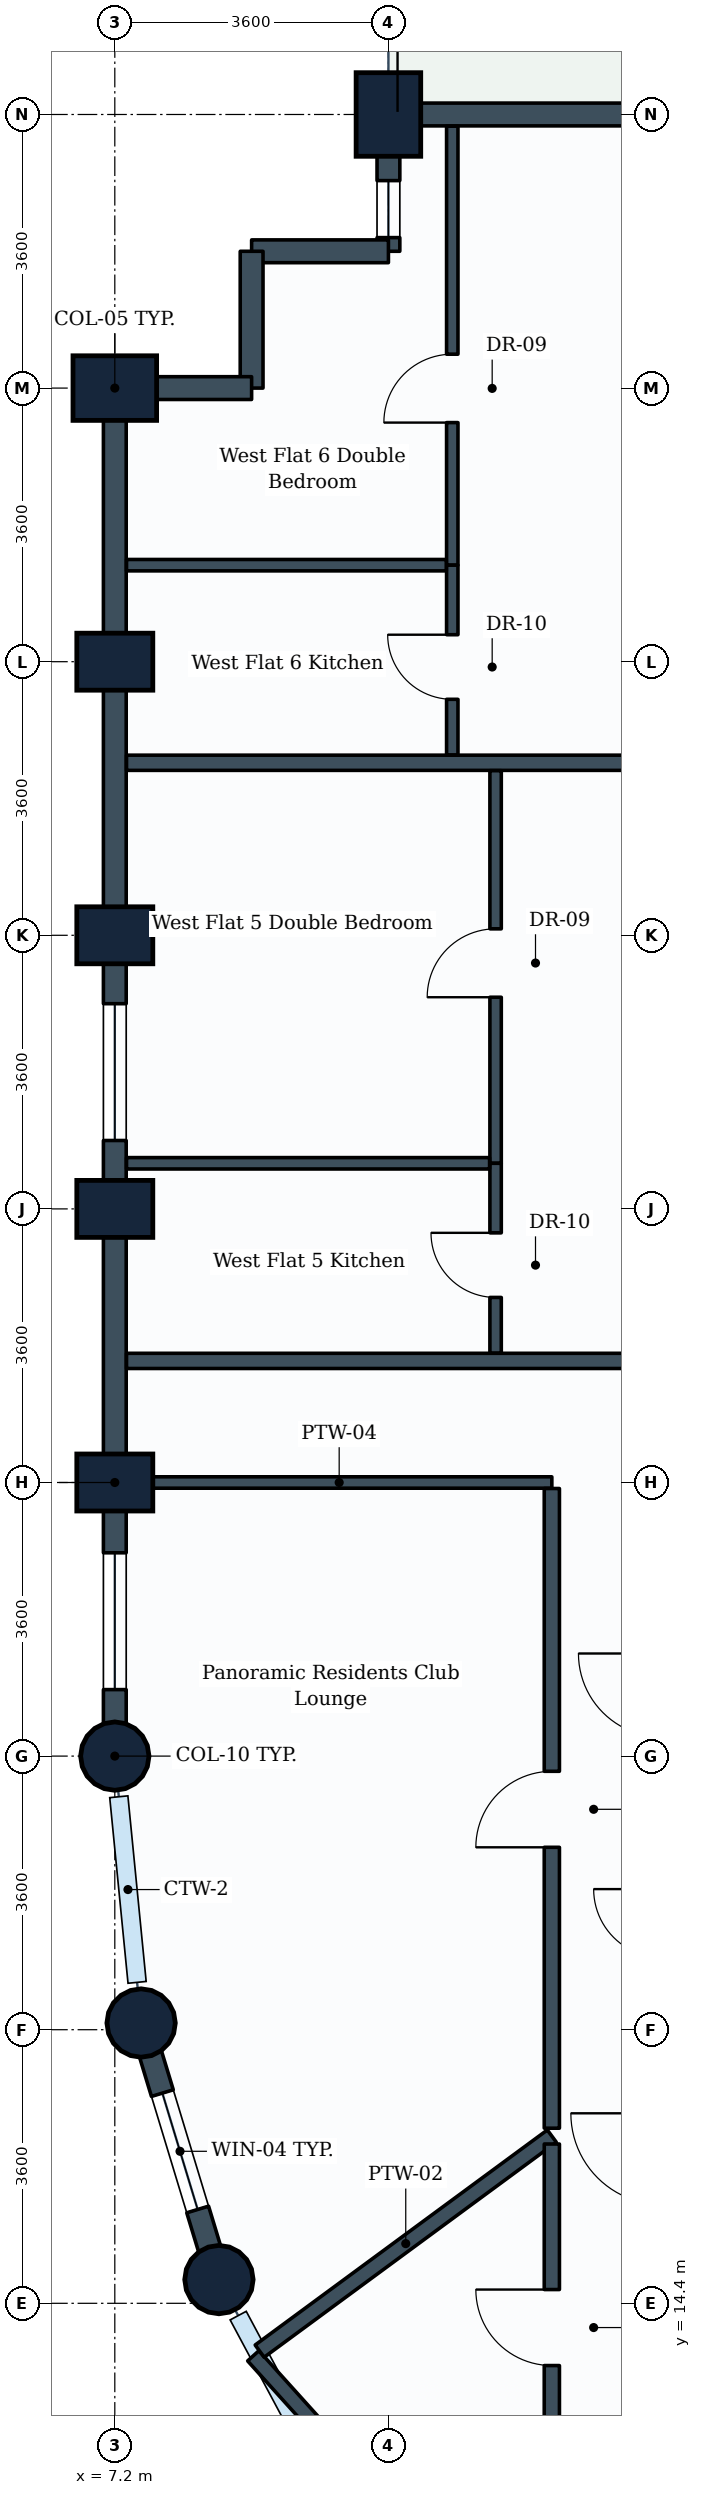
"""IFC4 building model, lengths in metres.
Left out: names, types, materials, properties, quantities, classifications, styles, units other than length and angle.
Written with IfcOpenShell. Run it as: python <this file> out.ifc"""

import sys

from ifc_helpers import new_model, si_unit, direction, frame, frame_2d, origin, origin_2d, place, context, subcontext, project, spatial, rectangle, circle, extrude, element, fill, save


model = new_model("IFC4")
c1 = context("Model", 3, precision=1e-05, world=origin(), true_north=direction((0.0, 1.0)))
c2 = subcontext(c1, "Body", "Model", "MODEL_VIEW")
j1 = project(units=[si_unit("LENGTHUNIT", "METRE"), si_unit("PLANEANGLEUNIT", "RADIAN")], contexts=[c1])
p1 = place(None, origin())
s1 = spatial("IfcSite", under=j1, at=p1, CompositionType="ELEMENT")
p2 = place(p1, origin())
s2 = spatial("IfcBuilding", under=s1, at=p2, CompositionType="ELEMENT")
p3 = place(p2, frame((0.0, 0.0, 135.2)))
s3 = spatial("IfcBuildingStorey", under=s2, at=p3, CompositionType="ELEMENT", Elevation=135.2)
p4 = place(p3, frame((7.2, 21.6, 0.0), z_axis=(0.0, 0.0, 1.0), x_axis=(1.0, 0.0, 0.0)))
e1 = element("IfcColumn", 1, at=p4, inside=s3, PredefinedType="COLUMN", context=c2, shape_type="SweptSolid", body=[
    extrude(circle(Radius=0.45, at=origin_2d()), origin(), (0.0, 0.0, 1.0), 3.8),
])
for number, where, z_axis, x_axis in (
    (2, (7.2, 25.2, 0.0), (0.0, 0.0, 1.0), (0.0, 1.0, 0.0)),
    (3, (7.2, 28.8, 0.0), (0.0, 0.0, 1.0), (0.0, 1.0, 0.0)),
    (4, (7.2, 32.4, 0.0), (0.0, 0.0, 1.0), (0.0, 1.0, 0.0)),
    (5, (7.2, 36.0, 0.0), (0.0, 0.0, 1.0), (0.0, 1.0, 0.0)),
):
    element("IfcColumn", number, at=place(p3, frame(where, z_axis=z_axis, x_axis=x_axis)), inside=s3, PredefinedType="COLUMN", context=c2, shape_type="SweptSolid", body=[
        extrude(rectangle(XDim=0.75, YDim=1.0, at=origin_2d()), origin(), (0.0, 0.0, 1.0), 3.8),
    ])
p5 = place(p3, frame((7.2, 39.6, 0.0), z_axis=(0.0, 0.0, 1.0), x_axis=(0.0, 1.0, 0.0)))
e6 = element("IfcColumn", 6, at=p5, inside=s3, PredefinedType="COLUMN", context=c2, shape_type="SweptSolid", body=[
    extrude(rectangle(XDim=0.85, YDim=1.1, at=origin_2d()), origin(), (0.0, 0.0, 1.0), 3.8),
])
for number, where, z_axis, x_axis in (
    (7, (7.546, 18.088, 0.0), (0.0, 0.0, 1.0), (1.0, 0.0, 0.0)),
    (8, (8.57, 14.712, 0.0), (0.0, 0.0, 1.0), (1.0, 0.0, 0.0)),
):
    element("IfcColumn", number, at=place(p3, frame(where, z_axis=z_axis, x_axis=x_axis)), inside=s3, PredefinedType="COLUMN", context=c2, shape_type="SweptSolid", body=[
        extrude(circle(Radius=0.45, at=origin_2d()), origin(), (0.0, 0.0, 1.0), 3.8),
    ])
p6 = place(p3, frame((10.8, 43.2, 0.0), z_axis=(0.0, 0.0, 1.0), x_axis=(1.0, 0.0, 0.0)))
e9 = element("IfcColumn", 9, at=p6, inside=s3, PredefinedType="COLUMN", context=c2, shape_type="SweptSolid", body=[
    extrude(rectangle(XDim=0.85, YDim=1.1, at=origin_2d()), origin(), (0.0, 0.0, 1.0), 3.8),
])
p7 = place(p3, frame((10.8, 43.2, 0.0), z_axis=(0.0, 0.0, 1.0), x_axis=(1.0, 0.0, 0.0)))
e10 = element("IfcWall", 10, at=p7, inside=s3, PredefinedType="STANDARD", context=c2, shape_type="SweptSolid", body=[
    extrude(rectangle(XDim=3.6, YDim=0.3, at=frame_2d((1.8, 0.0))), origin(), (0.0, 0.0, 1.0), 2.93),
])
p8 = place(p3, frame((10.8, 41.4, 0.0), z_axis=(0.0, 0.0, 1.0), x_axis=(0.0, 1.0, 0.0)))
e11 = element("IfcWall", 11, at=p8, inside=s3, PredefinedType="STANDARD", context=c2, shape_type="SweptSolid", body=[
    extrude(rectangle(XDim=1.8, YDim=0.3, at=frame_2d((0.9, 0.0))), origin(), (0.0, 0.0, 1.0), 2.93),
])
p9 = place(p8, frame((0.18, 0.0, 0.85)))
e12 = element("IfcOpeningElement", 12, at=p9, cuts=e11, PredefinedType="OPENING", context=c2, shape_type="SweptSolid", body=[
    extrude(rectangle(XDim=0.75, YDim=1.05, at=frame_2d((0.375, 0.525))), frame((0.0, 0.16, 0.0), z_axis=(0.0, -1.0, 0.0), x_axis=(1.0, 0.0, 0.0)), (0.0, 0.0, 1.0), 0.32),
])
p10 = place(p3, frame((9.0, 41.4, 0.0), z_axis=(0.0, 0.0, 1.0), x_axis=(1.0, 0.0, 0.0)))
e13 = element("IfcWall", 13, at=p10, inside=s3, PredefinedType="STANDARD", context=c2, shape_type="SweptSolid", body=[
    extrude(rectangle(XDim=1.8, YDim=0.3, at=frame_2d((0.9, 0.0))), origin(), (0.0, 0.0, 1.0), 3.535),
])
p11 = place(p3, frame((9.0, 39.6, 0.0), z_axis=(0.0, 0.0, 1.0), x_axis=(0.0, 1.0, 0.0)))
e14 = element("IfcWall", 14, at=p11, inside=s3, PredefinedType="STANDARD", context=c2, shape_type="SweptSolid", body=[
    extrude(rectangle(XDim=1.8, YDim=0.3, at=frame_2d((0.9, 0.0))), origin(), (0.0, 0.0, 1.0), 3.535),
])
p12 = place(p3, frame((7.2, 39.6, 0.0), z_axis=(0.0, 0.0, 1.0), x_axis=(1.0, 0.0, 0.0)))
e15 = element("IfcWall", 15, at=p12, inside=s3, PredefinedType="STANDARD", context=c2, shape_type="SweptSolid", body=[
    extrude(rectangle(XDim=1.8, YDim=0.3, at=frame_2d((0.9, 0.0))), origin(), (0.0, 0.0, 1.0), 2.93),
])
for number, where, z_axis, x_axis in (
    (16, (7.2, 36.0, 0.0), (0.0, 0.0, 1.0), (0.0, 1.0, 0.0)),
    (17, (7.2, 32.4, 0.0), (0.0, 0.0, 1.0), (0.0, 1.0, 0.0)),
):
    element("IfcWall", number, at=place(p3, frame(where, z_axis=z_axis, x_axis=x_axis)), inside=s3, PredefinedType="STANDARD", context=c2, shape_type="SweptSolid", body=[
        extrude(rectangle(XDim=3.6, YDim=0.3, at=frame_2d((1.8, 0.0))), origin(), (0.0, 0.0, 1.0), 2.93),
    ])
p13 = place(p3, frame((7.2, 28.8, 0.0), z_axis=(0.0, 0.0, 1.0), x_axis=(0.0, 1.0, 0.0)))
e18 = element("IfcWall", 18, at=p13, inside=s3, PredefinedType="STANDARD", context=c2, shape_type="SweptSolid", body=[
    extrude(rectangle(XDim=3.6, YDim=0.3, at=frame_2d((1.8, 0.0))), origin(), (0.0, 0.0, 1.0), 2.93),
])
p14 = place(p13, frame((0.9, 0.0, 0.85)))
e19 = element("IfcOpeningElement", 19, at=p14, cuts=e18, PredefinedType="OPENING", context=c2, shape_type="SweptSolid", body=[
    extrude(rectangle(XDim=1.8, YDim=1.35, at=frame_2d((0.9, 0.675))), frame((0.0, 0.16, 0.0), z_axis=(0.0, -1.0, 0.0), x_axis=(1.0, 0.0, 0.0)), (0.0, 0.0, 1.0), 0.32),
])
p15 = place(p3, frame((7.2, 25.2, 0.0), z_axis=(0.0, 0.0, 1.0), x_axis=(0.0, 1.0, 0.0)))
e20 = element("IfcWall", 20, at=p15, inside=s3, PredefinedType="STANDARD", context=c2, shape_type="SweptSolid", body=[
    extrude(rectangle(XDim=3.6, YDim=0.3, at=frame_2d((1.8, 0.0))), origin(), (0.0, 0.0, 1.0), 2.93),
])
p16 = place(p3, frame((7.2, 21.6, 0.0), z_axis=(0.0, 0.0, 1.0), x_axis=(0.0, 1.0, 0.0)))
e21 = element("IfcWall", 21, at=p16, inside=s3, PredefinedType="STANDARD", context=c2, shape_type="SweptSolid", body=[
    extrude(rectangle(XDim=3.6, YDim=0.3, at=frame_2d((1.8, 0.0))), origin(), (0.0, 0.0, 1.0), 2.93),
])
p17 = place(p16, frame((0.875, 0.0, 0.85)))
e22 = element("IfcOpeningElement", 22, at=p17, cuts=e21, PredefinedType="OPENING", context=c2, shape_type="SweptSolid", body=[
    extrude(rectangle(XDim=1.8, YDim=1.35, at=frame_2d((0.9, 0.675))), frame((0.0, 0.16, 0.0), z_axis=(0.0, -1.0, 0.0), x_axis=(1.0, 0.0, 0.0)), (0.0, 0.0, 1.0), 0.32),
])
p18 = place(p3, frame((8.57, 14.712, 0.0), z_axis=(0.0, 0.0, 1.0), x_axis=(-0.290305086481, 0.956934144423, 0.0)))
e23 = element("IfcWall", 23, at=p18, inside=s3, PredefinedType="STANDARD", context=c2, shape_type="SweptSolid", body=[
    extrude(rectangle(XDim=3.528, YDim=0.3, at=frame_2d((1.764, 0.0))), origin(), (0.0, 0.0, 1.0), 2.93),
])
p19 = place(p18, frame((0.964, 0.0, 0.85)))
e24 = element("IfcOpeningElement", 24, at=p19, cuts=e23, PredefinedType="OPENING", context=c2, shape_type="SweptSolid", body=[
    extrude(rectangle(XDim=1.6, YDim=1.35, at=frame_2d((0.8, 0.675))), frame((0.0, 0.16, 0.0), z_axis=(0.0, -1.0, 0.0), x_axis=(1.0, 0.0, 0.0)), (0.0, 0.0, 1.0), 0.32),
])
p20 = place(p3, frame((7.354, 25.2, 0.0), z_axis=(0.0, 0.0, 1.0), x_axis=(1.0, 0.0, 0.0)))
e25 = element("IfcWall", 25, at=p20, inside=s3, PredefinedType="PARTITIONING", context=c2, shape_type="SweptSolid", body=[
    extrude(rectangle(XDim=5.596, YDim=0.15, at=frame_2d((2.798, 0.0))), origin(), (0.0, 0.0, 1.0), 3.535),
])
p21 = place(p3, frame((12.95, 9.35, 0.0), z_axis=(0.0, 0.0, 1.0), x_axis=(-0.669433552235, 0.742871939934, 0.0)))
e26 = element("IfcWall", 26, at=p21, inside=s3, PredefinedType="PARTITIONING", context=c2, shape_type="SweptSolid", body=[
    extrude(rectangle(XDim=5.868, YDim=0.2, at=frame_2d((2.934, 0.0))), origin(), (0.0, 0.0, 1.0), 2.93),
])
p22 = place(p3, frame((12.95, 16.6, 0.0), z_axis=(0.0, 0.0, 1.0), x_axis=(-0.805356553796, -0.592790706116, 0.0)))
e27 = element("IfcWall", 27, at=p22, inside=s3, PredefinedType="PARTITIONING", context=c2, shape_type="SweptSolid", body=[
    extrude(rectangle(XDim=4.773, YDim=0.2, at=frame_2d((2.387, 0.0))), origin(), (0.0, 0.0, 1.0), 2.93),
])
p23 = place(p3, frame((12.95, 16.704, 0.0), z_axis=(0.0, 0.0, 1.0), x_axis=(0.0, 1.0, 0.0)))
e28 = element("IfcWall", 28, at=p23, inside=s3, PredefinedType="PARTITIONING", context=c2, shape_type="SweptSolid", body=[
    extrude(rectangle(XDim=8.417, YDim=0.2, at=frame_2d((4.208, 0.0))), origin(), (0.0, 0.0, 1.0), 3.18),
])
p24 = place(p23, frame((3.696, 0.0, 0.0)))
e29 = element("IfcOpeningElement", 29, at=p24, cuts=e28, PredefinedType="OPENING", context=c2, shape_type="SweptSolid", body=[
    extrude(rectangle(XDim=1.0, YDim=2.1, at=frame_2d((0.5, 1.05))), frame((0.0, 0.11, 0.0), z_axis=(0.0, -1.0, 0.0), x_axis=(1.0, 0.0, 0.0)), (0.0, 0.0, 1.0), 0.22),
])
p25 = place(p3, frame((12.95, 9.619, 0.0), z_axis=(0.0, 0.0, 1.0), x_axis=(0.0, 1.0, 0.0)))
e30 = element("IfcWall", 30, at=p25, inside=s3, PredefinedType="PARTITIONING", context=c2, shape_type="SweptSolid", body=[
    extrude(rectangle(XDim=6.877, YDim=0.2, at=frame_2d((3.438, 0.0))), origin(), (0.0, 0.0, 1.0), 3.17),
])
p26 = place(p25, frame((3.962, 0.0, 0.0)))
e31 = element("IfcOpeningElement", 31, at=p26, cuts=e30, PredefinedType="OPENING", context=c2, shape_type="SweptSolid", body=[
    extrude(rectangle(XDim=1.0, YDim=2.1, at=frame_2d((0.5, 1.05))), frame((0.0, 0.11, 0.0), z_axis=(0.0, -1.0, 0.0), x_axis=(1.0, 0.0, 0.0)), (0.0, 0.0, 1.0), 0.22),
])
for number, where, z_axis, x_axis in (
    (32, (7.354, 26.8, 0.0), (0.0, 0.0, 1.0), (1.0, 0.0, 0.0)),
    (33, (7.354, 34.67, 0.0), (0.0, 0.0, 1.0), (1.0, 0.0, 0.0)),
):
    element("IfcWall", number, at=place(p3, frame(where, z_axis=z_axis, x_axis=x_axis)), inside=s3, PredefinedType="PARTITIONING", context=c2, shape_type="SweptSolid", body=[
        extrude(rectangle(XDim=14.046, YDim=0.2, at=frame_2d((7.023, 0.0))), origin(), (0.0, 0.0, 1.0), 2.93),
    ])
p27 = place(p3, frame((12.21, 29.4, 0.0), z_axis=(0.0, 0.0, 1.0), x_axis=(0.0, 1.0, 0.0)))
e34 = element("IfcWall", 34, at=p27, inside=s3, PredefinedType="PARTITIONING", context=c2, shape_type="SweptSolid", body=[
    extrude(rectangle(XDim=5.166, YDim=0.15, at=frame_2d((2.583, 0.0))), origin(), (0.0, 0.0, 1.0), 3.18),
])
p28 = place(p27, frame((2.185, 0.0, 0.0)))
e35 = element("IfcOpeningElement", 35, at=p28, cuts=e34, PredefinedType="OPENING", context=c2, shape_type="SweptSolid", body=[
    extrude(rectangle(XDim=0.9, YDim=2.1, at=frame_2d((0.45, 1.05))), frame((0.0, 0.085, 0.0), z_axis=(0.0, -1.0, 0.0), x_axis=(1.0, 0.0, 0.0)), (0.0, 0.0, 1.0), 0.17),
])
p29 = place(p3, frame((12.21, 26.904, 0.0), z_axis=(0.0, 0.0, 1.0), x_axis=(0.0, 1.0, 0.0)))
e36 = element("IfcWall", 36, at=p29, inside=s3, PredefinedType="PARTITIONING", context=c2, shape_type="SweptSolid", body=[
    extrude(rectangle(XDim=2.496, YDim=0.15, at=frame_2d((1.248, 0.0))), origin(), (0.0, 0.0, 1.0), 3.17),
])
p30 = place(p29, frame((0.731, 0.0, 0.0)))
e37 = element("IfcOpeningElement", 37, at=p30, cuts=e36, PredefinedType="OPENING", context=c2, shape_type="SweptSolid", body=[
    extrude(rectangle(XDim=0.85, YDim=2.1, at=frame_2d((0.425, 1.05))), frame((0.0, 0.085, 0.0), z_axis=(0.0, -1.0, 0.0), x_axis=(1.0, 0.0, 0.0)), (0.0, 0.0, 1.0), 0.17),
])
p31 = place(p3, frame((7.354, 29.4, 0.0), z_axis=(0.0, 0.0, 1.0), x_axis=(1.0, 0.0, 0.0)))
e38 = element("IfcWall", 38, at=p31, inside=s3, PredefinedType="PARTITIONING", context=c2, shape_type="SweptSolid", body=[
    extrude(rectangle(XDim=4.777, YDim=0.15, at=frame_2d((2.389, 0.0))), origin(), (0.0, 0.0, 1.0), 2.93),
])
p32 = place(p3, frame((11.64, 37.27, 0.0), z_axis=(0.0, 0.0, 1.0), x_axis=(0.0, 1.0, 0.0)))
e39 = element("IfcWall", 39, at=p32, inside=s3, PredefinedType="PARTITIONING", context=c2, shape_type="SweptSolid", body=[
    extrude(rectangle(XDim=5.776, YDim=0.15, at=frame_2d((2.888, 0.0))), origin(), (0.0, 0.0, 1.0), 2.93),
])
p33 = place(p32, frame((1.876, 0.0, 0.0)))
e40 = element("IfcOpeningElement", 40, at=p33, cuts=e39, PredefinedType="OPENING", context=c2, shape_type="SweptSolid", body=[
    extrude(rectangle(XDim=0.9, YDim=2.1, at=frame_2d((0.45, 1.05))), frame((0.0, 0.085, 0.0), z_axis=(0.0, -1.0, 0.0), x_axis=(1.0, 0.0, 0.0)), (0.0, 0.0, 1.0), 0.17),
])
p34 = place(p3, frame((11.64, 34.774, 0.0), z_axis=(0.0, 0.0, 1.0), x_axis=(0.0, 1.0, 0.0)))
e41 = element("IfcWall", 41, at=p34, inside=s3, PredefinedType="PARTITIONING", context=c2, shape_type="SweptSolid", body=[
    extrude(rectangle(XDim=2.496, YDim=0.15, at=frame_2d((1.248, 0.0))), origin(), (0.0, 0.0, 1.0), 3.17),
])
p35 = place(p34, frame((0.731, 0.0, 0.0)))
e42 = element("IfcOpeningElement", 42, at=p35, cuts=e41, PredefinedType="OPENING", context=c2, shape_type="SweptSolid", body=[
    extrude(rectangle(XDim=0.85, YDim=2.1, at=frame_2d((0.425, 1.05))), frame((0.0, 0.085, 0.0), z_axis=(0.0, -1.0, 0.0), x_axis=(1.0, 0.0, 0.0)), (0.0, 0.0, 1.0), 0.17),
])
p36 = place(p3, frame((7.354, 37.27, 0.0), z_axis=(0.0, 0.0, 1.0), x_axis=(1.0, 0.0, 0.0)))
e43 = element("IfcWall", 43, at=p36, inside=s3, PredefinedType="PARTITIONING", context=c2, shape_type="SweptSolid", body=[
    extrude(rectangle(XDim=4.207, YDim=0.15, at=frame_2d((2.104, 0.0))), origin(), (0.0, 0.0, 1.0), 2.93),
])
p37 = place(p14, origin())
e44 = element("IfcWindow", 44, at=p37, inside=s3, PartitioningType="SINGLE_PANEL", PredefinedType="WINDOW", context=c2, shape_type="SweptSolid", body=[
    extrude(rectangle(XDim=1.8, YDim=1.35, at=frame_2d((0.9, 0.675))), frame((0.0, 0.03, 0.0), z_axis=(0.0, -1.0, 0.0), x_axis=(1.0, 0.0, 0.0)), (0.0, 0.0, 1.0), 0.06),
])
fill(e19, e44)
p38 = place(p17, origin())
e45 = element("IfcWindow", 45, at=p38, inside=s3, PartitioningType="SINGLE_PANEL", PredefinedType="WINDOW", context=c2, shape_type="SweptSolid", body=[
    extrude(rectangle(XDim=1.8, YDim=1.35, at=frame_2d((0.9, 0.675))), frame((0.0, 0.03, 0.0), z_axis=(0.0, -1.0, 0.0), x_axis=(1.0, 0.0, 0.0)), (0.0, 0.0, 1.0), 0.06),
])
fill(e22, e45)
p39 = place(p19, origin())
e46 = element("IfcWindow", 46, at=p39, inside=s3, PartitioningType="SINGLE_PANEL", PredefinedType="WINDOW", context=c2, shape_type="SweptSolid", body=[
    extrude(rectangle(XDim=1.6, YDim=1.35, at=frame_2d((0.8, 0.675))), frame((0.0, 0.03, 0.0), z_axis=(0.0, -1.0, 0.0), x_axis=(1.0, 0.0, 0.0)), (0.0, 0.0, 1.0), 0.06),
])
fill(e24, e46)
p40 = place(p24, origin())
e47 = element("IfcDoor", 47, at=p40, inside=s3, OperationType="SINGLE_SWING_LEFT", PredefinedType="DOOR", context=c2, shape_type="SweptSolid", body=[
    extrude(rectangle(XDim=1.0, YDim=2.1, at=frame_2d((0.5, 1.05))), frame((0.0, 0.025, 0.0), z_axis=(0.0, -1.0, 0.0), x_axis=(1.0, 0.0, 0.0)), (0.0, 0.0, 1.0), 0.05),
])
fill(e29, e47)
p41 = place(p26, origin())
e48 = element("IfcDoor", 48, at=p41, inside=s3, OperationType="SINGLE_SWING_RIGHT", PredefinedType="DOOR", context=c2, shape_type="SweptSolid", body=[
    extrude(rectangle(XDim=1.0, YDim=2.1, at=frame_2d((0.5, 1.05))), frame((0.0, 0.025, 0.0), z_axis=(0.0, -1.0, 0.0), x_axis=(1.0, 0.0, 0.0)), (0.0, 0.0, 1.0), 0.05),
])
fill(e31, e48)
p42 = place(p28, origin())
e49 = element("IfcDoor", 49, at=p42, inside=s3, OperationType="SINGLE_SWING_LEFT", PredefinedType="DOOR", context=c2, shape_type="SweptSolid", body=[
    extrude(rectangle(XDim=0.9, YDim=2.1, at=frame_2d((0.45, 1.05))), frame((0.0, 0.025, 0.0), z_axis=(0.0, -1.0, 0.0), x_axis=(1.0, 0.0, 0.0)), (0.0, 0.0, 1.0), 0.05),
])
fill(e35, e49)
p43 = place(p30, origin())
e50 = element("IfcDoor", 50, at=p43, inside=s3, OperationType="SINGLE_SWING_RIGHT", PredefinedType="DOOR", context=c2, shape_type="SweptSolid", body=[
    extrude(rectangle(XDim=0.85, YDim=2.1, at=frame_2d((0.425, 1.05))), frame((0.0, 0.025, 0.0), z_axis=(0.0, -1.0, 0.0), x_axis=(1.0, 0.0, 0.0)), (0.0, 0.0, 1.0), 0.05),
])
fill(e37, e50)
p44 = place(p33, origin())
e51 = element("IfcDoor", 51, at=p44, inside=s3, OperationType="SINGLE_SWING_LEFT", PredefinedType="DOOR", context=c2, shape_type="SweptSolid", body=[
    extrude(rectangle(XDim=0.9, YDim=2.1, at=frame_2d((0.45, 1.05))), frame((0.0, 0.025, 0.0), z_axis=(0.0, -1.0, 0.0), x_axis=(1.0, 0.0, 0.0)), (0.0, 0.0, 1.0), 0.05),
])
fill(e40, e51)
p45 = place(p35, origin())
e52 = element("IfcDoor", 52, at=p45, inside=s3, OperationType="SINGLE_SWING_RIGHT", PredefinedType="DOOR", context=c2, shape_type="SweptSolid", body=[
    extrude(rectangle(XDim=0.85, YDim=2.1, at=frame_2d((0.425, 1.05))), frame((0.0, 0.025, 0.0), z_axis=(0.0, -1.0, 0.0), x_axis=(1.0, 0.0, 0.0)), (0.0, 0.0, 1.0), 0.05),
])
fill(e42, e52)
p46 = place(p9, origin())
e53 = element("IfcWindow", 53, at=p46, inside=s3, PartitioningType="SINGLE_PANEL", PredefinedType="WINDOW", context=c2, shape_type="SweptSolid", body=[
    extrude(rectangle(XDim=0.75, YDim=1.05, at=frame_2d((0.375, 0.525))), frame((0.0, 0.03, 0.0), z_axis=(0.0, -1.0, 0.0), x_axis=(1.0, 0.0, 0.0)), (0.0, 0.0, 1.0), 0.06),
])
fill(e12, e53)
save(model, sys.argv[1])
